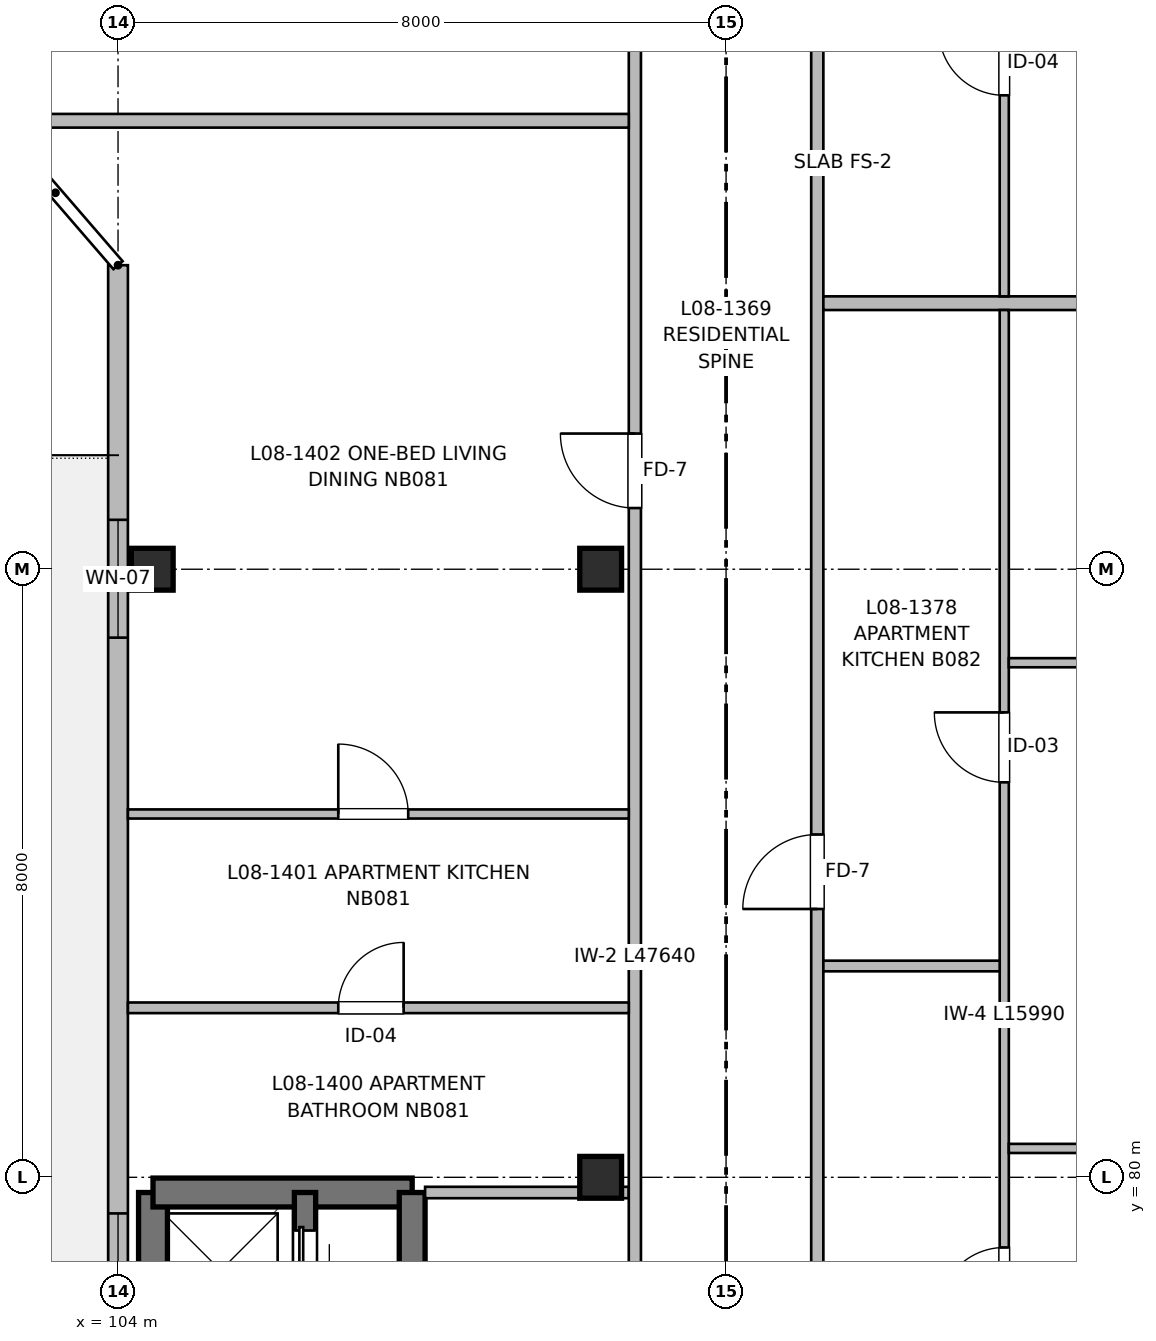
"""IFC4 building model, lengths in metres.
Left out: names, types, materials, properties, quantities, classifications, styles, units other than length and angle.
Written with IfcOpenShell. Run it as: python <this file> out.ifc"""

import sys

from ifc_helpers import new_model, si_unit, direction, frame, frame_2d, origin, origin_2d, place, context, subcontext, project, spatial, rectangle, extrude, element, fill, save


model = new_model("IFC4")
c1 = context("Model", 3, precision=1e-05, world=origin(), true_north=direction((0.0, 1.0)))
c2 = subcontext(c1, "Body", "Model", "MODEL_VIEW")
j1 = project(units=[si_unit("LENGTHUNIT", "METRE"), si_unit("PLANEANGLEUNIT", "RADIAN")], contexts=[c1])
p1 = place(None, origin())
s1 = spatial("IfcSite", under=j1, at=p1, CompositionType="ELEMENT")
p2 = place(p1, origin())
s2 = spatial("IfcBuilding", under=s1, at=p2, CompositionType="ELEMENT")
p3 = place(p2, frame((0.0, 0.0, 26.56)))
s3 = spatial("IfcBuildingStorey", under=s2, at=p3, CompositionType="ELEMENT", Elevation=26.56)
for number, where, z_axis, x_axis in (
    (1, (104.45, 88.0, 0.0), (0.0, 0.0, 1.0), (1.0, 0.0, 0.0)),
    (2, (110.35, 80.0, 0.0), (0.0, 0.0, 1.0), (1.0, 0.0, 0.0)),
    (3, (110.35, 88.0, 0.0), (0.0, 0.0, 1.0), (1.0, 0.0, 0.0)),
):
    element("IfcColumn", number, at=place(p3, frame(where, z_axis=z_axis, x_axis=x_axis)), inside=s3, PredefinedType="COLUMN", context=c2, shape_type="SweptSolid", body=[
        extrude(rectangle(XDim=0.55, YDim=0.55, at=origin_2d()), origin(), (0.0, 0.0, 1.0), 3.2),
    ])
p4 = place(p3, frame((104.46, 67.35, 0.0), z_axis=(0.0, 0.0, 1.0), x_axis=(0.0, 1.0, 0.0)))
e4 = element("IfcWall", 4, at=p4, inside=s3, PredefinedType="SHEAR", context=c2, shape_type="SweptSolid", body=[
    extrude(rectangle(XDim=12.45, YDim=0.38, at=frame_2d((6.225, 0.0))), origin(), (0.0, 0.0, 1.0), 3.2),
])
p5 = place(p4, frame((2.2, 0.0, 0.97)))
e5 = element("IfcOpeningElement", 5, at=p5, cuts=e4, PredefinedType="OPENING", context=c2, shape_type="SweptSolid", body=[
    extrude(rectangle(XDim=0.95, YDim=1.25, at=frame_2d((0.475, 0.625))), frame((0.0, 0.2, 0.0), z_axis=(0.0, -1.0, 0.0), x_axis=(1.0, 0.0, 0.0)), (0.0, 0.0, 1.0), 0.4),
])
p6 = place(p3, frame((104.46, 79.8, 0.0), z_axis=(0.0, 0.0, 1.0), x_axis=(1.0, 0.0, 0.0)))
e6 = element("IfcWall", 6, at=p6, inside=s3, PredefinedType="SHEAR", context=c2, shape_type="SweptSolid", body=[
    extrude(rectangle(XDim=3.41, YDim=0.38, at=frame_2d((1.705, 0.0))), origin(), (0.0, 0.0, 1.0), 3.2),
])
p7 = place(p3, frame((107.87, 79.8, 0.0), z_axis=(0.0, 0.0, 1.0), x_axis=(0.0, -1.0, 0.0)))
e7 = element("IfcWall", 7, at=p7, inside=s3, PredefinedType="SHEAR", context=c2, shape_type="SweptSolid", body=[
    extrude(rectangle(XDim=12.45, YDim=0.34, at=frame_2d((6.225, 0.0))), origin(), (0.0, 0.0, 1.0), 3.2),
])
p8 = place(p7, frame((10.85, 0.0, 0.0)))
e8 = element("IfcOpeningElement", 8, at=p8, cuts=e7, PredefinedType="OPENING", context=c2, shape_type="SweptSolid", body=[
    extrude(rectangle(XDim=1.05, YDim=2.15, at=frame_2d((0.525, 1.075))), frame((0.0, 0.18, 0.0), z_axis=(0.0, -1.0, 0.0), x_axis=(1.0, 0.0, 0.0)), (0.0, 0.0, 1.0), 0.36),
])
p9 = place(p3, frame((106.46, 74.55, 0.0), z_axis=(0.0, 0.0, 1.0), x_axis=(0.0, 1.0, 0.0)))
e9 = element("IfcWall", 9, at=p9, inside=s3, PredefinedType="SHEAR", context=c2, shape_type="SweptSolid", body=[
    extrude(rectangle(XDim=5.25, YDim=0.28, at=frame_2d((2.625, 0.0))), origin(), (0.0, 0.0, 1.0), 3.2),
])
p10 = place(p9, frame((1.15, 0.0, 0.0)))
e10 = element("IfcOpeningElement", 10, at=p10, cuts=e9, PredefinedType="OPENING", context=c2, shape_type="SweptSolid", body=[
    extrude(rectangle(XDim=1.0, YDim=2.15, at=frame_2d((0.5, 1.075))), frame((0.0, 0.15, 0.0), z_axis=(0.0, -1.0, 0.0), x_axis=(1.0, 0.0, 0.0)), (0.0, 0.0, 1.0), 0.3),
])
p11 = place(p9, frame((3.85, 0.0, 0.0)))
e11 = element("IfcOpeningElement", 11, at=p11, cuts=e9, PredefinedType="OPENING", context=c2, shape_type="SweptSolid", body=[
    extrude(rectangle(XDim=0.9, YDim=2.15, at=frame_2d((0.45, 1.075))), frame((0.0, 0.15, 0.0), z_axis=(0.0, -1.0, 0.0), x_axis=(1.0, 0.0, 0.0)), (0.0, 0.0, 1.0), 0.3),
])
p12 = place(p3, frame((104.0, 59.0, 0.0), z_axis=(0.0, 0.0, 1.0), x_axis=(0.0, 1.0, 0.0)))
e12 = element("IfcWall", 12, at=p12, inside=s3, PredefinedType="SOLIDWALL", context=c2, shape_type="SweptSolid", body=[
    extrude(rectangle(XDim=33.0, YDim=0.26, at=frame_2d((16.5, 0.0))), origin(), (0.0, 0.0, 1.0), 2.98),
])
p13 = place(p12, frame((3.125, 0.0, 0.0)))
e13 = element("IfcOpeningElement", 13, at=p13, cuts=e12, PredefinedType="OPENING", context=c2, shape_type="SweptSolid", body=[
    extrude(rectangle(XDim=1.2, YDim=2.2, at=frame_2d((0.6, 1.1))), frame((0.0, 0.14, 0.0), z_axis=(0.0, -1.0, 0.0), x_axis=(1.0, 0.0, 0.0)), (0.0, 0.0, 1.0), 0.28),
])
p14 = place(p12, frame((5.425, 0.0, 0.62)))
e14 = element("IfcOpeningElement", 14, at=p14, cuts=e12, PredefinedType="OPENING", context=c2, shape_type="SweptSolid", body=[
    extrude(rectangle(XDim=1.1, YDim=1.6, at=frame_2d((0.55, 0.8))), frame((0.0, 0.14, 0.0), z_axis=(0.0, -1.0, 0.0), x_axis=(1.0, 0.0, 0.0)), (0.0, 0.0, 1.0), 0.28),
])
p15 = place(p12, frame((11.175, 0.0, 0.72)))
e15 = element("IfcOpeningElement", 15, at=p15, cuts=e12, PredefinedType="OPENING", context=c2, shape_type="SweptSolid", body=[
    extrude(rectangle(XDim=2.4, YDim=1.5, at=frame_2d((1.2, 0.75))), frame((0.0, 0.14, 0.0), z_axis=(0.0, -1.0, 0.0), x_axis=(1.0, 0.0, 0.0)), (0.0, 0.0, 1.0), 0.28),
])
p16 = place(p12, frame((19.025, 0.0, 0.82)))
e16 = element("IfcOpeningElement", 16, at=p16, cuts=e12, PredefinedType="OPENING", context=c2, shape_type="SweptSolid", body=[
    extrude(rectangle(XDim=1.5, YDim=1.4, at=frame_2d((0.75, 0.7))), frame((0.0, 0.14, 0.0), z_axis=(0.0, -1.0, 0.0), x_axis=(1.0, 0.0, 0.0)), (0.0, 0.0, 1.0), 0.28),
])
p17 = place(p12, frame((28.1, 0.0, 0.82)))
e17 = element("IfcOpeningElement", 17, at=p17, cuts=e12, PredefinedType="OPENING", context=c2, shape_type="SweptSolid", body=[
    extrude(rectangle(XDim=1.55, YDim=1.4, at=frame_2d((0.775, 0.7))), frame((0.0, 0.14, 0.0), z_axis=(0.0, -1.0, 0.0), x_axis=(1.0, 0.0, 0.0)), (0.0, 0.0, 1.0), 0.28),
])
p18 = place(p3, frame((108.04, 79.8, 0.0), z_axis=(0.0, 0.0, 1.0), x_axis=(1.0, 0.0, 0.0)))
e18 = element("IfcWall", 18, at=p18, inside=s3, PredefinedType="PARTITIONING", context=c2, shape_type="SweptSolid", body=[
    extrude(rectangle(XDim=2.68, YDim=0.15, at=frame_2d((1.34, 0.0))), origin(), (0.0, 0.0, 1.0), 2.935),
])
p19 = place(p3, frame((110.8, 59.16, 0.0), z_axis=(0.0, 0.0, 1.0), x_axis=(0.0, 1.0, 0.0)))
e19 = element("IfcWall", 19, at=p19, inside=s3, PredefinedType="PARTITIONING", context=c2, shape_type="SweptSolid", body=[
    extrude(rectangle(XDim=47.64, YDim=0.16, at=frame_2d((23.82, 0.0))), origin(), (0.0, 0.0, 1.0), 2.935),
])
p20 = place(p19, frame((9.84, 0.0, 0.0)))
e20 = element("IfcOpeningElement", 20, at=p20, cuts=e19, PredefinedType="OPENING", context=c2, shape_type="SweptSolid", body=[
    extrude(rectangle(XDim=1.1, YDim=2.15, at=frame_2d((0.55, 1.075))), frame((0.0, 0.09, 0.0), z_axis=(0.0, -1.0, 0.0), x_axis=(1.0, 0.0, 0.0)), (0.0, 0.0, 1.0), 0.18),
])
p21 = place(p19, frame((16.24, 0.0, 0.0)))
e21 = element("IfcOpeningElement", 21, at=p21, cuts=e19, PredefinedType="OPENING", context=c2, shape_type="SweptSolid", body=[
    extrude(rectangle(XDim=1.6, YDim=2.15, at=frame_2d((0.8, 1.075))), frame((0.0, 0.09, 0.0), z_axis=(0.0, -1.0, 0.0), x_axis=(1.0, 0.0, 0.0)), (0.0, 0.0, 1.0), 0.18),
])
p22 = place(p19, frame((1.8, 0.0, 0.0)))
e22 = element("IfcOpeningElement", 22, at=p22, cuts=e19, PredefinedType="OPENING", context=c2, shape_type="SweptSolid", body=[
    extrude(rectangle(XDim=0.96, YDim=2.15, at=frame_2d((0.48, 1.075))), frame((0.0, 0.09, 0.0), z_axis=(0.0, -1.0, 0.0), x_axis=(1.0, 0.0, 0.0)), (0.0, 0.0, 1.0), 0.18),
])
p23 = place(p19, frame((29.645, 0.0, 0.0)))
e23 = element("IfcOpeningElement", 23, at=p23, cuts=e19, PredefinedType="OPENING", context=c2, shape_type="SweptSolid", body=[
    extrude(rectangle(XDim=0.98, YDim=2.15, at=frame_2d((0.49, 1.075))), frame((0.0, 0.09, 0.0), z_axis=(0.0, -1.0, 0.0), x_axis=(1.0, 0.0, 0.0)), (0.0, 0.0, 1.0), 0.18),
])
p24 = place(p19, frame((38.255, 0.0, 0.0)))
e24 = element("IfcOpeningElement", 24, at=p24, cuts=e19, PredefinedType="OPENING", context=c2, shape_type="SweptSolid", body=[
    extrude(rectangle(XDim=0.98, YDim=2.15, at=frame_2d((0.49, 1.075))), frame((0.0, 0.09, 0.0), z_axis=(0.0, -1.0, 0.0), x_axis=(1.0, 0.0, 0.0)), (0.0, 0.0, 1.0), 0.18),
])
p25 = place(p3, frame((113.2, 59.16, 0.0), z_axis=(0.0, 0.0, 1.0), x_axis=(0.0, 1.0, 0.0)))
e25 = element("IfcWall", 25, at=p25, inside=s3, PredefinedType="PARTITIONING", context=c2, shape_type="SweptSolid", body=[
    extrude(rectangle(XDim=47.64, YDim=0.16, at=frame_2d((23.82, 0.0))), origin(), (0.0, 0.0, 1.0), 2.935),
])
p26 = place(p25, frame((8.15, 0.0, 0.0)))
e26 = element("IfcOpeningElement", 26, at=p26, cuts=e25, PredefinedType="OPENING", context=c2, shape_type="SweptSolid", body=[
    extrude(rectangle(XDim=0.98, YDim=2.15, at=frame_2d((0.49, 1.075))), frame((0.0, 0.09, 0.0), z_axis=(0.0, -1.0, 0.0), x_axis=(1.0, 0.0, 0.0)), (0.0, 0.0, 1.0), 0.18),
])
p27 = place(p25, frame((24.37, 0.0, 0.0)))
e27 = element("IfcOpeningElement", 27, at=p27, cuts=e25, PredefinedType="OPENING", context=c2, shape_type="SweptSolid", body=[
    extrude(rectangle(XDim=0.98, YDim=2.15, at=frame_2d((0.49, 1.075))), frame((0.0, 0.09, 0.0), z_axis=(0.0, -1.0, 0.0), x_axis=(1.0, 0.0, 0.0)), (0.0, 0.0, 1.0), 0.18),
])
p28 = place(p25, frame((40.14, 0.0, 0.0)))
e28 = element("IfcOpeningElement", 28, at=p28, cuts=e25, PredefinedType="OPENING", context=c2, shape_type="SweptSolid", body=[
    extrude(rectangle(XDim=0.98, YDim=2.15, at=frame_2d((0.49, 1.075))), frame((0.0, 0.09, 0.0), z_axis=(0.0, -1.0, 0.0), x_axis=(1.0, 0.0, 0.0)), (0.0, 0.0, 1.0), 0.18),
])
p29 = place(p3, frame((113.28, 91.5, 0.0), z_axis=(0.0, 0.0, 1.0), x_axis=(1.0, 0.0, 0.0)))
e29 = element("IfcWall", 29, at=p29, inside=s3, PredefinedType="PARTITIONING", context=c2, shape_type="SweptSolid", body=[
    extrude(rectangle(XDim=9.477, YDim=0.18, at=frame_2d((4.738, 0.0))), origin(), (0.0, 0.0, 1.0), 2.935),
])
p30 = place(p3, frame((115.66, 75.42, 0.0), z_axis=(0.0, 0.0, 1.0), x_axis=(0.0, 1.0, 0.0)))
e30 = element("IfcWall", 30, at=p30, inside=s3, PredefinedType="PARTITIONING", context=c2, shape_type="SweptSolid", body=[
    extrude(rectangle(XDim=15.99, YDim=0.12, at=frame_2d((7.995, 0.0))), origin(), (0.0, 0.0, 1.0), 2.935),
])
p31 = place(p30, frame((2.797, 0.0, 0.0)))
e31 = element("IfcOpeningElement", 31, at=p31, cuts=e30, PredefinedType="OPENING", context=c2, shape_type="SweptSolid", body=[
    extrude(rectangle(XDim=0.86, YDim=2.1, at=frame_2d((0.43, 1.05))), frame((0.0, 0.07, 0.0), z_axis=(0.0, -1.0, 0.0), x_axis=(1.0, 0.0, 0.0)), (0.0, 0.0, 1.0), 0.14),
])
p32 = place(p30, frame((9.776, 0.0, 0.0)))
e32 = element("IfcOpeningElement", 32, at=p32, cuts=e30, PredefinedType="OPENING", context=c2, shape_type="SweptSolid", body=[
    extrude(rectangle(XDim=0.92, YDim=2.1, at=frame_2d((0.46, 1.05))), frame((0.0, 0.07, 0.0), z_axis=(0.0, -1.0, 0.0), x_axis=(1.0, 0.0, 0.0)), (0.0, 0.0, 1.0), 0.14),
])
p33 = place(p3, frame((113.28, 82.78, 0.0), z_axis=(0.0, 0.0, 1.0), x_axis=(1.0, 0.0, 0.0)))
e33 = element("IfcWall", 33, at=p33, inside=s3, PredefinedType="PARTITIONING", context=c2, shape_type="SweptSolid", body=[
    extrude(rectangle(XDim=2.32, YDim=0.14, at=frame_2d((1.16, 0.0))), origin(), (0.0, 0.0, 1.0), 2.935),
])
p34 = place(p3, frame((115.72, 80.38, 0.0), z_axis=(0.0, 0.0, 1.0), x_axis=(1.0, 0.0, 0.0)))
e34 = element("IfcWall", 34, at=p34, inside=s3, PredefinedType="PARTITIONING", context=c2, shape_type="SweptSolid", body=[
    extrude(rectangle(XDim=4.15, YDim=0.12, at=frame_2d((2.075, 0.0))), origin(), (0.0, 0.0, 1.0), 2.935),
])
p35 = place(p34, frame((1.625, 0.0, 0.0)))
e35 = element("IfcOpeningElement", 35, at=p35, cuts=e34, PredefinedType="OPENING", context=c2, shape_type="SweptSolid", body=[
    extrude(rectangle(XDim=0.9, YDim=2.1, at=frame_2d((0.45, 1.05))), frame((0.0, 0.07, 0.0), z_axis=(0.0, -1.0, 0.0), x_axis=(1.0, 0.0, 0.0)), (0.0, 0.0, 1.0), 0.14),
])
p36 = place(p3, frame((115.72, 86.77, 0.0), z_axis=(0.0, 0.0, 1.0), x_axis=(1.0, 0.0, 0.0)))
e36 = element("IfcWall", 36, at=p36, inside=s3, PredefinedType="PARTITIONING", context=c2, shape_type="SweptSolid", body=[
    extrude(rectangle(XDim=4.15, YDim=0.12, at=frame_2d((2.075, 0.0))), origin(), (0.0, 0.0, 1.0), 2.935),
])
p37 = place(p36, frame((1.635, 0.0, 0.0)))
e37 = element("IfcOpeningElement", 37, at=p37, cuts=e36, PredefinedType="OPENING", context=c2, shape_type="SweptSolid", body=[
    extrude(rectangle(XDim=0.88, YDim=2.1, at=frame_2d((0.44, 1.05))), frame((0.0, 0.07, 0.0), z_axis=(0.0, -1.0, 0.0), x_axis=(1.0, 0.0, 0.0)), (0.0, 0.0, 1.0), 0.14),
])
p38 = place(p3, frame((115.66, 91.59, 0.0), z_axis=(0.0, 0.0, 1.0), x_axis=(0.0, 1.0, 0.0)))
e38 = element("IfcWall", 38, at=p38, inside=s3, PredefinedType="PARTITIONING", context=c2, shape_type="SweptSolid", body=[
    extrude(rectangle(XDim=15.13, YDim=0.12, at=frame_2d((7.565, 0.0))), origin(), (0.0, 0.0, 1.0), 2.68),
])
p39 = place(p38, frame((2.645, 0.0, 0.0)))
e39 = element("IfcOpeningElement", 39, at=p39, cuts=e38, PredefinedType="OPENING", context=c2, shape_type="SweptSolid", body=[
    extrude(rectangle(XDim=0.86, YDim=2.1, at=frame_2d((0.43, 1.05))), frame((0.0, 0.07, 0.0), z_axis=(0.0, -1.0, 0.0), x_axis=(1.0, 0.0, 0.0)), (0.0, 0.0, 1.0), 0.14),
])
p40 = place(p38, frame((9.548, 0.0, 0.0)))
e40 = element("IfcOpeningElement", 40, at=p40, cuts=e38, PredefinedType="OPENING", context=c2, shape_type="SweptSolid", body=[
    extrude(rectangle(XDim=0.92, YDim=2.1, at=frame_2d((0.46, 1.05))), frame((0.0, 0.07, 0.0), z_axis=(0.0, -1.0, 0.0), x_axis=(1.0, 0.0, 0.0)), (0.0, 0.0, 1.0), 0.14),
])
p41 = place(p3, frame((102.411, 93.9, 0.0), z_axis=(0.0, 0.0, 1.0), x_axis=(1.0, 0.0, 0.0)))
e41 = element("IfcWall", 41, at=p41, inside=s3, PredefinedType="PARTITIONING", context=c2, shape_type="SweptSolid", body=[
    extrude(rectangle(XDim=8.309, YDim=0.18, at=frame_2d((4.155, 0.0))), origin(), (0.0, 0.0, 1.0), 2.935),
])
p42 = place(p3, frame((104.13, 82.23, 0.0), z_axis=(0.0, 0.0, 1.0), x_axis=(1.0, 0.0, 0.0)))
e42 = element("IfcWall", 42, at=p42, inside=s3, PredefinedType="PARTITIONING", context=c2, shape_type="SweptSolid", body=[
    extrude(rectangle(XDim=6.59, YDim=0.14, at=frame_2d((3.295, 0.0))), origin(), (0.0, 0.0, 1.0), 2.935),
])
p43 = place(p42, frame((2.768, 0.0, 0.0)))
e43 = element("IfcOpeningElement", 43, at=p43, cuts=e42, PredefinedType="OPENING", context=c2, shape_type="SweptSolid", body=[
    extrude(rectangle(XDim=0.86, YDim=2.1, at=frame_2d((0.43, 1.05))), frame((0.0, 0.08, 0.0), z_axis=(0.0, -1.0, 0.0), x_axis=(1.0, 0.0, 0.0)), (0.0, 0.0, 1.0), 0.16),
])
p44 = place(p3, frame((104.13, 84.78, 0.0), z_axis=(0.0, 0.0, 1.0), x_axis=(1.0, 0.0, 0.0)))
e44 = element("IfcWall", 44, at=p44, inside=s3, PredefinedType="PARTITIONING", context=c2, shape_type="SweptSolid", body=[
    extrude(rectangle(XDim=6.59, YDim=0.12, at=frame_2d((3.295, 0.0))), origin(), (0.0, 0.0, 1.0), 2.935),
])
p45 = place(p44, frame((2.768, 0.0, 0.0)))
e45 = element("IfcOpeningElement", 45, at=p45, cuts=e44, PredefinedType="OPENING", context=c2, shape_type="SweptSolid", body=[
    extrude(rectangle(XDim=0.92, YDim=2.1, at=frame_2d((0.46, 1.05))), frame((0.0, 0.07, 0.0), z_axis=(0.0, -1.0, 0.0), x_axis=(1.0, 0.0, 0.0)), (0.0, 0.0, 1.0), 0.14),
])
p46 = place(p11, origin())
e46 = element("IfcDoor", 46, at=p46, inside=s3, OperationType="SLIDING_TO_RIGHT", PredefinedType="DOOR", context=c2, shape_type="SweptSolid", body=[
    extrude(rectangle(XDim=0.9, YDim=2.15, at=frame_2d((0.45, 1.075))), frame((0.0, 0.025, 0.0), z_axis=(0.0, -1.0, 0.0), x_axis=(1.0, 0.0, 0.0)), (0.0, 0.0, 1.0), 0.05),
])
fill(e11, e46)
p47 = place(p16, origin())
e47 = element("IfcWindow", 47, at=p47, inside=s3, PartitioningType="SINGLE_PANEL", PredefinedType="WINDOW", context=c2, shape_type="SweptSolid", body=[
    extrude(rectangle(XDim=1.5, YDim=1.4, at=frame_2d((0.75, 0.7))), frame((0.0, 0.03, 0.0), z_axis=(0.0, -1.0, 0.0), x_axis=(1.0, 0.0, 0.0)), (0.0, 0.0, 1.0), 0.06),
])
fill(e16, e47)
p48 = place(p17, origin())
e48 = element("IfcWindow", 48, at=p48, inside=s3, PartitioningType="SINGLE_PANEL", PredefinedType="WINDOW", context=c2, shape_type="SweptSolid", body=[
    extrude(rectangle(XDim=1.55, YDim=1.4, at=frame_2d((0.775, 0.7))), frame((0.0, 0.03, 0.0), z_axis=(0.0, -1.0, 0.0), x_axis=(1.0, 0.0, 0.0)), (0.0, 0.0, 1.0), 0.06),
])
fill(e17, e48)
p49 = place(p31, origin())
e49 = element("IfcDoor", 49, at=p49, inside=s3, OperationType="SINGLE_SWING_LEFT", PredefinedType="DOOR", context=c2, shape_type="SweptSolid", body=[
    extrude(rectangle(XDim=0.86, YDim=2.1, at=frame_2d((0.43, 1.05))), frame((0.0, 0.025, 0.0), z_axis=(0.0, -1.0, 0.0), x_axis=(1.0, 0.0, 0.0)), (0.0, 0.0, 1.0), 0.05),
])
fill(e31, e49)
p50 = place(p32, origin())
e50 = element("IfcDoor", 50, at=p50, inside=s3, OperationType="SINGLE_SWING_RIGHT", PredefinedType="DOOR", context=c2, shape_type="SweptSolid", body=[
    extrude(rectangle(XDim=0.92, YDim=2.1, at=frame_2d((0.46, 1.05))), frame((0.0, 0.025, 0.0), z_axis=(0.0, -1.0, 0.0), x_axis=(1.0, 0.0, 0.0)), (0.0, 0.0, 1.0), 0.05),
])
fill(e32, e50)
p51 = place(p27, origin())
e51 = element("IfcDoor", 51, at=p51, inside=s3, OperationType="SINGLE_SWING_LEFT", PredefinedType="DOOR", context=c2, shape_type="SweptSolid", body=[
    extrude(rectangle(XDim=0.98, YDim=2.15, at=frame_2d((0.49, 1.075))), frame((0.0, 0.025, 0.0), z_axis=(0.0, -1.0, 0.0), x_axis=(1.0, 0.0, 0.0)), (0.0, 0.0, 1.0), 0.05),
])
fill(e27, e51)
p52 = place(p39, origin())
e52 = element("IfcDoor", 52, at=p52, inside=s3, OperationType="SINGLE_SWING_RIGHT", PredefinedType="DOOR", context=c2, shape_type="SweptSolid", body=[
    extrude(rectangle(XDim=0.86, YDim=2.1, at=frame_2d((0.43, 1.05))), frame((0.0, 0.025, 0.0), z_axis=(0.0, -1.0, 0.0), x_axis=(1.0, 0.0, 0.0)), (0.0, 0.0, 1.0), 0.05),
])
fill(e39, e52)
p53 = place(p43, origin())
e53 = element("IfcDoor", 53, at=p53, inside=s3, OperationType="SINGLE_SWING_RIGHT", PredefinedType="DOOR", context=c2, shape_type="SweptSolid", body=[
    extrude(rectangle(XDim=0.86, YDim=2.1, at=frame_2d((0.43, 1.05))), frame((0.0, 0.025, 0.0), z_axis=(0.0, -1.0, 0.0), x_axis=(1.0, 0.0, 0.0)), (0.0, 0.0, 1.0), 0.05),
])
fill(e43, e53)
p54 = place(p45, origin())
e54 = element("IfcDoor", 54, at=p54, inside=s3, OperationType="SINGLE_SWING_LEFT", PredefinedType="DOOR", context=c2, shape_type="SweptSolid", body=[
    extrude(rectangle(XDim=0.92, YDim=2.1, at=frame_2d((0.46, 1.05))), frame((0.0, 0.025, 0.0), z_axis=(0.0, -1.0, 0.0), x_axis=(1.0, 0.0, 0.0)), (0.0, 0.0, 1.0), 0.05),
])
fill(e45, e54)
p55 = place(p23, origin())
e55 = element("IfcDoor", 55, at=p55, inside=s3, OperationType="SINGLE_SWING_RIGHT", PredefinedType="DOOR", context=c2, shape_type="SweptSolid", body=[
    extrude(rectangle(XDim=0.98, YDim=2.15, at=frame_2d((0.49, 1.075))), frame((0.0, 0.025, 0.0), z_axis=(0.0, -1.0, 0.0), x_axis=(1.0, 0.0, 0.0)), (0.0, 0.0, 1.0), 0.05),
])
fill(e23, e55)
save(model, sys.argv[1])
